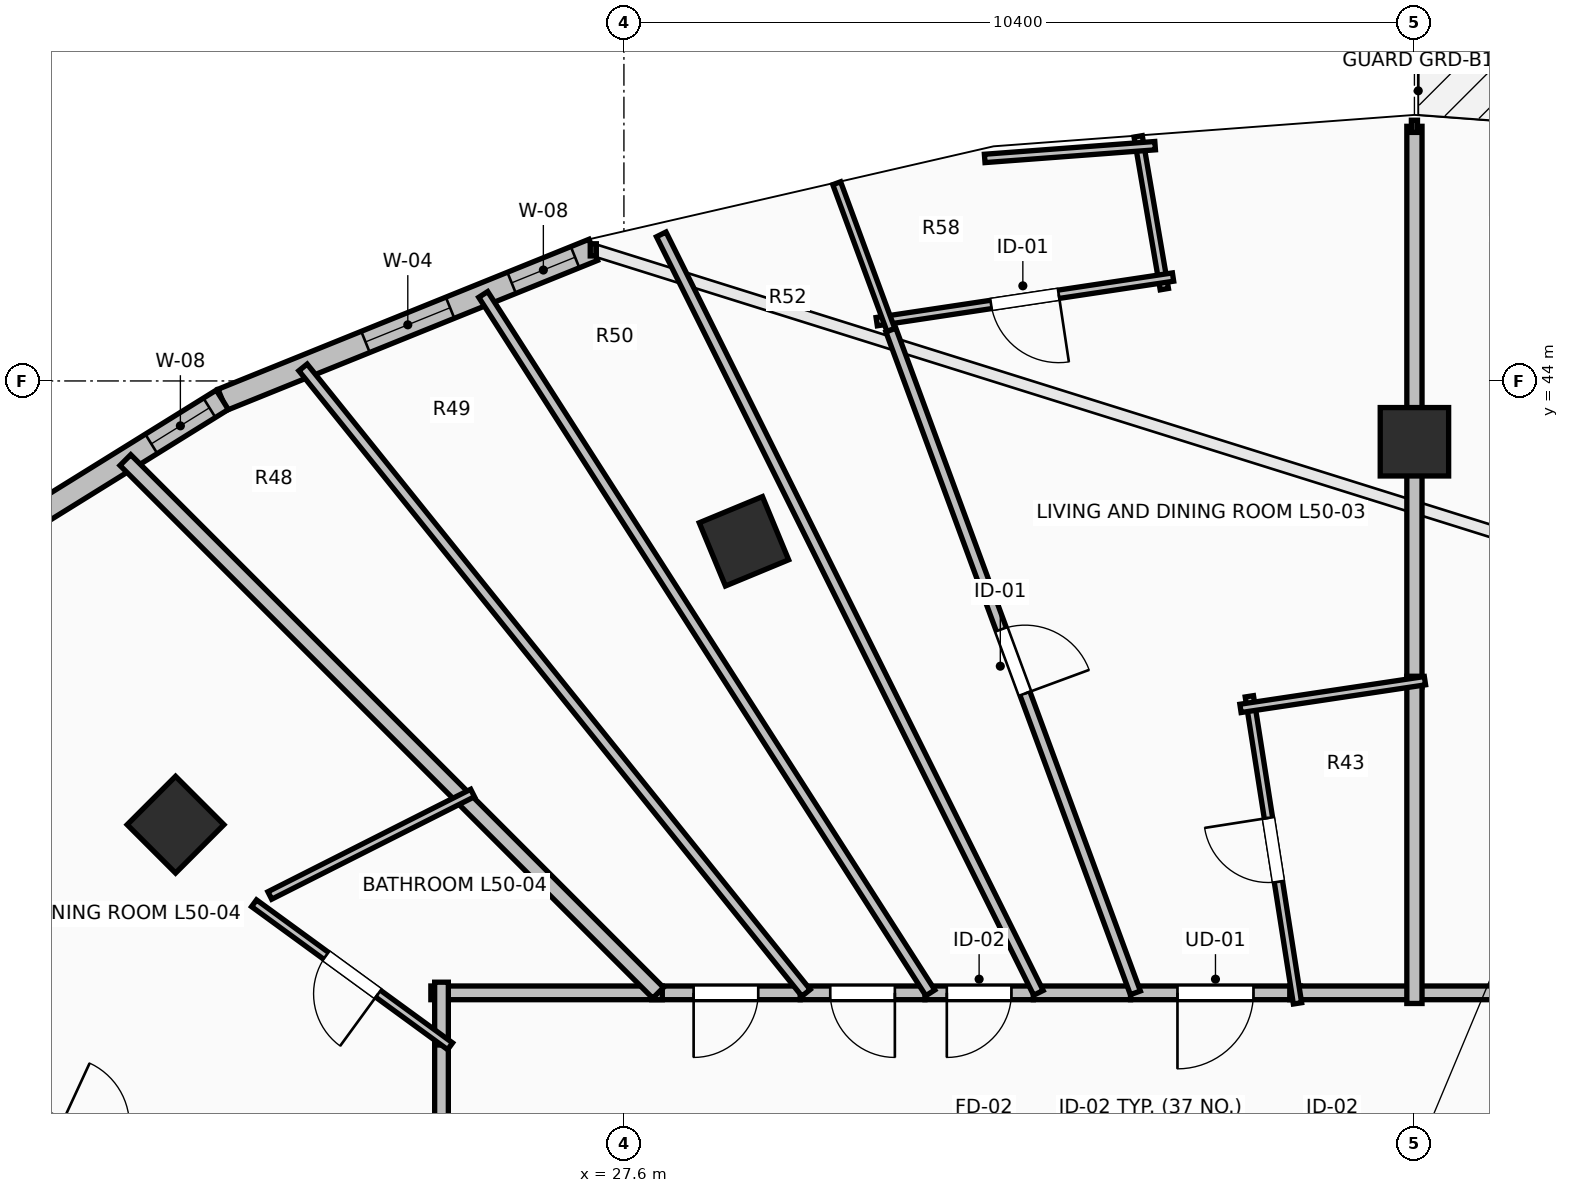
"""IFC4 building model, lengths in metres.
Left out: names, types, materials, properties, quantities, classifications, styles, units other than length and angle.
Written with IfcOpenShell. Run it as: python <this file> out.ifc"""

import sys

from ifc_helpers import new_model, si_unit, direction, frame, frame_2d, origin, origin_2d, place, context, subcontext, project, spatial, rectangle, extrude, element, fill, save


model = new_model("IFC4")
c1 = context("Model", 3, precision=1e-05, world=origin(), true_north=direction((0.0, 1.0)))
c2 = subcontext(c1, "Body", "Model", "MODEL_VIEW")
j1 = project(units=[si_unit("LENGTHUNIT", "METRE"), si_unit("PLANEANGLEUNIT", "RADIAN")], contexts=[c1])
p1 = place(None, origin())
s1 = spatial("IfcSite", under=j1, at=p1, CompositionType="ELEMENT")
p2 = place(p1, origin())
s2 = spatial("IfcBuilding", under=s1, at=p2, CompositionType="ELEMENT")
p3 = place(p2, frame((0.0, 0.0, 186.1)))
s3 = spatial("IfcBuildingStorey", under=s2, at=p3, CompositionType="ELEMENT", Elevation=186.1)
for number, where, z_axis, x_axis in (
    (1, (38.0, 43.2, 0.0), (0.0, 0.0, 1.0), (0.0, 1.0, 0.0)),
    (2, (29.179, 41.891, 0.0), (0.0, 0.0, 1.0), (-0.383, 0.924, 0.0)),
    (3, (21.701, 38.162, 0.0), (0.0, 0.0, 1.0), (-0.707, 0.707, 0.0)),
):
    element("IfcColumn", number, at=place(p3, frame(where, z_axis=z_axis, x_axis=x_axis)), inside=s3, PredefinedType="COLUMN", context=c2, shape_type="SweptSolid", body=[
        extrude(rectangle(XDim=0.9, YDim=0.9, at=origin_2d()), origin(), (0.0, 0.0, 1.0), 3.5),
    ])
p4 = place(p3, frame((27.197, 45.725, 0.0), z_axis=(0.0, 0.0, 1.0), x_axis=(-0.927111094334, -0.374786630981, 0.0)))
e4 = element("IfcWall", 4, at=p4, inside=s3, PredefinedType="STANDARD", context=c2, shape_type="SweptSolid", body=[
    extrude(rectangle(XDim=5.264, YDim=0.3, at=frame_2d((2.632, 0.0))), origin(), (0.0, 0.0, 1.0), 3.24),
])
p5 = place(p4, frame((0.258, 0.0, 0.85)))
e5 = element("IfcOpeningElement", 5, at=p5, cuts=e4, PredefinedType="OPENING", context=c2, shape_type="SweptSolid", body=[
    extrude(rectangle(XDim=0.9, YDim=1.8, at=frame_2d((0.45, 0.9))), frame((0.0, 0.165, 0.0), z_axis=(0.0, -1.0, 0.0), x_axis=(1.0, 0.0, 0.0)), (0.0, 0.0, 1.0), 0.33),
])
p6 = place(p4, frame((2.032, 0.0, 0.85)))
e6 = element("IfcOpeningElement", 6, at=p6, cuts=e4, PredefinedType="OPENING", context=c2, shape_type="SweptSolid", body=[
    extrude(rectangle(XDim=1.2, YDim=1.95, at=frame_2d((0.6, 0.975))), frame((0.0, 0.165, 0.0), z_axis=(0.0, -1.0, 0.0), x_axis=(1.0, 0.0, 0.0)), (0.0, 0.0, 1.0), 0.33),
])
p7 = place(p3, frame((22.316, 43.752, 0.0), z_axis=(0.0, 0.0, 1.0), x_axis=(-0.849647657754, -0.527350791858, 0.0)))
e7 = element("IfcWall", 7, at=p7, inside=s3, PredefinedType="STANDARD", context=c2, shape_type="SweptSolid", body=[
    extrude(rectangle(XDim=5.035, YDim=0.3, at=frame_2d((2.518, 0.0))), origin(), (0.0, 0.0, 1.0), 3.24),
])
p8 = place(p7, frame((0.199, 0.0, 0.85)))
e8 = element("IfcOpeningElement", 8, at=p8, cuts=e7, PredefinedType="OPENING", context=c2, shape_type="SweptSolid", body=[
    extrude(rectangle(XDim=0.9, YDim=1.8, at=frame_2d((0.45, 0.9))), frame((0.0, 0.165, 0.0), z_axis=(0.0, -1.0, 0.0), x_axis=(1.0, 0.0, 0.0)), (0.0, 0.0, 1.0), 0.33),
])
p9 = place(p3, frame((39.197, 35.95, 0.0), z_axis=(0.0, 0.0, 1.0), x_axis=(-1.0, 0.0, 0.0)))
e9 = element("IfcWall", 9, at=p9, inside=s3, PredefinedType="PARTITIONING", context=c2, shape_type="SweptSolid", body=[
    extrude(rectangle(XDim=1.257, YDim=0.18, at=frame_2d((0.628, 0.0))), origin(), (0.0, 0.0, 1.0), 2.922),
])
p10 = place(p3, frame((36.5, 35.95, 0.0), z_axis=(0.0, 0.0, 1.0), x_axis=(-1.0, 0.0, 0.0)))
e10 = element("IfcWall", 10, at=p10, inside=s3, PredefinedType="PARTITIONING", context=c2, shape_type="SweptSolid", body=[
    extrude(rectangle(XDim=2.235, YDim=0.18, at=frame_2d((1.118, 0.0))), origin(), (0.0, 0.0, 1.0), 2.922),
])
p11 = place(p10, frame((0.617, 0.0, 0.0)))
e11 = element("IfcOpeningElement", 11, at=p11, cuts=e10, PredefinedType="OPENING", context=c2, shape_type="SweptSolid", body=[
    extrude(rectangle(XDim=1.0, YDim=2.15, at=frame_2d((0.5, 1.075))), frame((0.0, 0.105, 0.0), z_axis=(0.0, -1.0, 0.0), x_axis=(1.0, 0.0, 0.0)), (0.0, 0.0, 1.0), 0.21),
])
p12 = place(p3, frame((38.08, 35.95, 0.0), z_axis=(0.0, 0.0, 1.0), x_axis=(-1.0, 0.0, 0.0)))
e12 = element("IfcWall", 12, at=p12, inside=s3, PredefinedType="PARTITIONING", context=c2, shape_type="SweptSolid", body=[
    extrude(rectangle(XDim=1.72, YDim=0.18, at=frame_2d((0.86, 0.0))), origin(), (0.0, 0.0, 1.0), 2.922),
])
p13 = place(p3, frame((34.265, 35.95, 0.0), z_axis=(0.0, 0.0, 1.0), x_axis=(-1.0, 0.0, 0.0)))
e13 = element("IfcWall", 13, at=p13, inside=s3, PredefinedType="PARTITIONING", context=c2, shape_type="SweptSolid", body=[
    extrude(rectangle(XDim=1.279, YDim=0.18, at=frame_2d((0.639, 0.0))), origin(), (0.0, 0.0, 1.0), 2.922),
])
p14 = place(p3, frame((32.986, 35.95, 0.0), z_axis=(0.0, 0.0, 1.0), x_axis=(-1.0, 0.0, 0.0)))
e14 = element("IfcWall", 14, at=p14, inside=s3, PredefinedType="PARTITIONING", context=c2, shape_type="SweptSolid", body=[
    extrude(rectangle(XDim=1.426, YDim=0.18, at=frame_2d((0.713, 0.0))), origin(), (0.0, 0.0, 1.0), 3.24),
])
p15 = place(p14, frame((0.288, 0.0, 0.0)))
e15 = element("IfcOpeningElement", 15, at=p15, cuts=e14, PredefinedType="OPENING", context=c2, shape_type="SweptSolid", body=[
    extrude(rectangle(XDim=0.85, YDim=2.1, at=frame_2d((0.425, 1.05))), frame((0.0, 0.105, 0.0), z_axis=(0.0, -1.0, 0.0), x_axis=(1.0, 0.0, 0.0)), (0.0, 0.0, 1.0), 0.21),
])
p16 = place(p3, frame((31.56, 35.95, 0.0), z_axis=(0.0, 0.0, 1.0), x_axis=(-1.0, 0.0, 0.0)))
e16 = element("IfcWall", 16, at=p16, inside=s3, PredefinedType="PARTITIONING", context=c2, shape_type="SweptSolid", body=[
    extrude(rectangle(XDim=1.641, YDim=0.18, at=frame_2d((0.821, 0.0))), origin(), (0.0, 0.0, 1.0), 2.432),
])
p17 = place(p16, frame((0.396, 0.0, 0.0)))
e17 = element("IfcOpeningElement", 17, at=p17, cuts=e16, PredefinedType="OPENING", context=c2, shape_type="SweptSolid", body=[
    extrude(rectangle(XDim=0.85, YDim=2.1, at=frame_2d((0.425, 1.05))), frame((0.0, 0.105, 0.0), z_axis=(0.0, -1.0, 0.0), x_axis=(1.0, 0.0, 0.0)), (0.0, 0.0, 1.0), 0.21),
])
p18 = place(p3, frame((29.919, 35.95, 0.0), z_axis=(0.0, 0.0, 1.0), x_axis=(-1.0, 0.0, 0.0)))
e18 = element("IfcWall", 18, at=p18, inside=s3, PredefinedType="PARTITIONING", context=c2, shape_type="SweptSolid", body=[
    extrude(rectangle(XDim=1.954, YDim=0.18, at=frame_2d((0.977, 0.0))), origin(), (0.0, 0.0, 1.0), 2.432),
])
p19 = place(p18, frame((0.552, 0.0, 0.0)))
e19 = element("IfcOpeningElement", 19, at=p19, cuts=e18, PredefinedType="OPENING", context=c2, shape_type="SweptSolid", body=[
    extrude(rectangle(XDim=0.85, YDim=2.1, at=frame_2d((0.425, 1.05))), frame((0.0, 0.105, 0.0), z_axis=(0.0, -1.0, 0.0), x_axis=(1.0, 0.0, 0.0)), (0.0, 0.0, 1.0), 0.21),
])
p20 = place(p3, frame((25.2, 35.404, 0.0), z_axis=(0.0, 0.0, 1.0), x_axis=(0.0, -1.0, 0.0)))
e20 = element("IfcWall", 20, at=p20, inside=s3, PredefinedType="PARTITIONING", context=c2, shape_type="SweptSolid", body=[
    extrude(rectangle(XDim=3.563, YDim=0.18, at=frame_2d((1.781, 0.0))), origin(), (0.0, 0.0, 1.0), 2.432),
])
p21 = place(p20, frame((1.281, 0.0, 0.0)))
e21 = element("IfcOpeningElement", 21, at=p21, cuts=e20, PredefinedType="OPENING", context=c2, shape_type="SweptSolid", body=[
    extrude(rectangle(XDim=1.0, YDim=2.15, at=frame_2d((0.5, 1.075))), frame((0.0, 0.105, 0.0), z_axis=(0.0, -1.0, 0.0), x_axis=(1.0, 0.0, 0.0)), (0.0, 0.0, 1.0), 0.21),
])
p22 = place(p3, frame((28.105, 35.95, 0.0), z_axis=(0.0, 0.0, 1.0), x_axis=(-1.0, 0.0, 0.0)))
e22 = element("IfcWall", 22, at=p22, inside=s3, PredefinedType="PARTITIONING", context=c2, shape_type="SweptSolid", body=[
    extrude(rectangle(XDim=3.045, YDim=0.18, at=frame_2d((1.522, 0.0))), origin(), (0.0, 0.0, 1.0), 2.432),
])
p23 = place(p3, frame((25.2, 36.09, 0.0), z_axis=(0.0, 0.0, 1.0), x_axis=(0.0, -1.0, 0.0)))
e23 = element("IfcWall", 23, at=p23, inside=s3, PredefinedType="PARTITIONING", context=c2, shape_type="SweptSolid", body=[
    extrude(rectangle(XDim=0.826, YDim=0.18, at=frame_2d((0.413, 0.0))), origin(), (0.0, 0.0, 1.0), 2.432),
])
p24 = place(p3, frame((38.0, 47.35, 0.0), z_axis=(0.0, 0.0, 1.0), x_axis=(0.0, -1.0, 0.0)))
e24 = element("IfcWall", 24, at=p24, inside=s3, PredefinedType="PARTITIONING", context=c2, shape_type="SweptSolid", body=[
    extrude(rectangle(XDim=7.375, YDim=0.2, at=frame_2d((3.688, 0.0))), origin(), (0.0, 0.0, 1.0), 3.24),
])
p25 = place(p3, frame((38.0, 40.115, 0.0), z_axis=(0.0, 0.0, 1.0), x_axis=(0.0, -1.0, 0.0)))
e25 = element("IfcWall", 25, at=p25, inside=s3, PredefinedType="PARTITIONING", context=c2, shape_type="SweptSolid", body=[
    extrude(rectangle(XDim=4.305, YDim=0.2, at=frame_2d((2.152, 0.0))), origin(), (0.0, 0.0, 1.0), 2.874),
])
p26 = place(p3, frame((36.462, 35.812, 0.0), z_axis=(0.0, 0.0, 1.0), x_axis=(-0.154883213323, 0.987932786292, 0.0)))
e26 = element("IfcWall", 26, at=p26, inside=s3, PredefinedType="PARTITIONING", context=c2, shape_type="SweptSolid", body=[
    extrude(rectangle(XDim=4.089, YDim=0.11, at=frame_2d((2.044, 0.0))), origin(), (0.0, 0.0, 1.0), 2.874),
])
p27 = place(p26, frame((1.619, 0.0, 0.0)))
e27 = element("IfcOpeningElement", 27, at=p27, cuts=e26, PredefinedType="OPENING", context=c2, shape_type="SweptSolid", body=[
    extrude(rectangle(XDim=0.85, YDim=2.1, at=frame_2d((0.425, 1.05))), frame((0.0, 0.07, 0.0), z_axis=(0.0, -1.0, 0.0), x_axis=(1.0, 0.0, 0.0)), (0.0, 0.0, 1.0), 0.14),
])
p28 = place(p3, frame((35.712, 39.692, 0.0), z_axis=(0.0, 0.0, 1.0), x_axis=(0.988892526147, 0.148632337431, 0.0)))
e28 = element("IfcWall", 28, at=p28, inside=s3, PredefinedType="PARTITIONING", context=c2, shape_type="SweptSolid", body=[
    extrude(rectangle(XDim=2.454, YDim=0.11, at=frame_2d((1.227, 0.0))), origin(), (0.0, 0.0, 1.0), 3.24),
])
p29 = place(p3, frame((34.365, 47.218, 0.0), z_axis=(0.0, 0.0, 1.0), x_axis=(0.168804313657, -0.985649584635, 0.0)))
e29 = element("IfcWall", 29, at=p29, inside=s3, PredefinedType="PARTITIONING", context=c2, shape_type="SweptSolid", body=[
    extrude(rectangle(XDim=2.039, YDim=0.11, at=frame_2d((1.02, 0.0))), origin(), (0.0, 0.0, 1.0), 3.24),
])
p30 = place(p3, frame((34.824, 45.367, 0.0), z_axis=(0.0, 0.0, 1.0), x_axis=(-0.988877230123, -0.148734070555, 0.0)))
e30 = element("IfcWall", 30, at=p30, inside=s3, PredefinedType="PARTITIONING", context=c2, shape_type="SweptSolid", body=[
    extrude(rectangle(XDim=3.943, YDim=0.11, at=frame_2d((1.971, 0.0))), origin(), (0.0, 0.0, 1.0), 3.24),
])
p31 = place(p30, frame((1.521, 0.0, 0.0)))
e31 = element("IfcOpeningElement", 31, at=p31, cuts=e30, PredefinedType="OPENING", context=c2, shape_type="SweptSolid", body=[
    extrude(rectangle(XDim=0.9, YDim=2.1, at=frame_2d((0.45, 1.05))), frame((0.0, 0.07, 0.0), z_axis=(0.0, -1.0, 0.0), x_axis=(1.0, 0.0, 0.0)), (0.0, 0.0, 1.0), 0.14),
])
p32 = place(p3, frame((31.113, 44.67, 0.0), z_axis=(0.0, 0.0, 1.0), x_axis=(-0.346337161188, 0.938110105894, 0.0)))
e32 = element("IfcWall", 32, at=p32, inside=s3, PredefinedType="PARTITIONING", context=c2, shape_type="SweptSolid", body=[
    extrude(rectangle(XDim=2.059, YDim=0.11, at=frame_2d((1.03, 0.0))), origin(), (0.0, 0.0, 1.0), 3.24),
])
p33 = place(p3, frame((34.589, 47.095, 0.0), z_axis=(0.0, 0.0, 1.0), x_axis=(-0.997205784552, -0.074703569226, 0.0)))
e33 = element("IfcWall", 33, at=p33, inside=s3, PredefinedType="PARTITIONING", context=c2, shape_type="SweptSolid", body=[
    extrude(rectangle(XDim=2.249, YDim=0.11, at=frame_2d((1.124, 0.0))), origin(), (0.0, 0.0, 1.0), 3.24),
])
p34 = place(p3, frame((31.112, 44.67, 0.0), z_axis=(0.0, 0.0, 1.0), x_axis=(0.346109472243, -0.938194134081, 0.0)))
e34 = element("IfcWall", 34, at=p34, inside=s3, PredefinedType="PARTITIONING", context=c2, shape_type="SweptSolid", body=[
    extrude(rectangle(XDim=9.294, YDim=0.14, at=frame_2d((4.647, 0.0))), origin(), (0.0, 0.0, 1.0), 2.432),
])
p35 = place(p34, frame((4.197, 0.0, 0.0)))
e35 = element("IfcOpeningElement", 35, at=p35, cuts=e34, PredefinedType="OPENING", context=c2, shape_type="SweptSolid", body=[
    extrude(rectangle(XDim=0.9, YDim=2.1, at=frame_2d((0.45, 1.05))), frame((0.0, 0.085, 0.0), z_axis=(0.0, -1.0, 0.0), x_axis=(1.0, 0.0, 0.0)), (0.0, 0.0, 1.0), 0.17),
])
p36 = place(p3, frame((28.091, 45.928, 0.0), z_axis=(0.0, 0.0, 1.0), x_axis=(0.445267068418, -0.895397809793, 0.0)))
e36 = element("IfcWall", 36, at=p36, inside=s3, PredefinedType="PARTITIONING", context=c2, shape_type="SweptSolid", body=[
    extrude(rectangle(XDim=11.144, YDim=0.14, at=frame_2d((5.572, 0.0))), origin(), (0.0, 0.0, 1.0), 2.432),
])
p37 = place(p3, frame((25.749, 45.138, 0.0), z_axis=(0.0, 0.0, 1.0), x_axis=(0.539168632786, -0.842197830335, 0.0)))
e37 = element("IfcWall", 37, at=p37, inside=s3, PredefinedType="PARTITIONING", context=c2, shape_type="SweptSolid", body=[
    extrude(rectangle(XDim=10.909, YDim=0.14, at=frame_2d((5.455, 0.0))), origin(), (0.0, 0.0, 1.0), 2.432),
])
p38 = place(p3, frame((23.378, 44.178, 0.0), z_axis=(0.0, 0.0, 1.0), x_axis=(0.626756813732, -0.779214923137, 0.0)))
e38 = element("IfcWall", 38, at=p38, inside=s3, PredefinedType="PARTITIONING", context=c2, shape_type="SweptSolid", body=[
    extrude(rectangle(XDim=10.559, YDim=0.14, at=frame_2d((5.28, 0.0))), origin(), (0.0, 0.0, 1.0), 2.432),
])
p39 = place(p3, frame((21.041, 42.959, 0.0), z_axis=(0.0, 0.0, 1.0), x_axis=(0.707106781187, -0.707106781187, 0.0)))
e39 = element("IfcWall", 39, at=p39, inside=s3, PredefinedType="PARTITIONING", context=c2, shape_type="SweptSolid", body=[
    extrude(rectangle(XDim=9.912, YDim=0.2, at=frame_2d((4.956, 0.0))), origin(), (0.0, 0.0, 1.0), 2.432),
])
p40 = place(p3, frame((25.313, 35.248, 0.0), z_axis=(0.0, 0.0, 1.0), x_axis=(-0.807968083988, 0.58922625133, 0.0)))
e40 = element("IfcWall", 40, at=p40, inside=s3, PredefinedType="PARTITIONING", context=c2, shape_type="SweptSolid", body=[
    extrude(rectangle(XDim=3.192, YDim=0.11, at=frame_2d((1.596, 0.0))), origin(), (0.0, 0.0, 1.0), 2.432),
])
p41 = place(p40, frame((1.171, 0.0, 0.0)))
e41 = element("IfcOpeningElement", 41, at=p41, cuts=e40, PredefinedType="OPENING", context=c2, shape_type="SweptSolid", body=[
    extrude(rectangle(XDim=0.85, YDim=2.1, at=frame_2d((0.425, 1.05))), frame((0.0, 0.07, 0.0), z_axis=(0.0, -1.0, 0.0), x_axis=(1.0, 0.0, 0.0)), (0.0, 0.0, 1.0), 0.14),
])
p42 = place(p3, frame((22.941, 37.231, 0.0), z_axis=(0.0, 0.0, 1.0), x_axis=(0.892507731149, 0.451032094024, 0.0)))
e42 = element("IfcWall", 42, at=p42, inside=s3, PredefinedType="PARTITIONING", context=c2, shape_type="SweptSolid", body=[
    extrude(rectangle(XDim=2.989, YDim=0.11, at=frame_2d((1.495, 0.0))), origin(), (0.0, 0.0, 1.0), 2.432),
])
p43 = place(p3, frame((16.006, 36.139, 0.0), z_axis=(0.0, 0.0, 1.0), x_axis=(0.908157621609, -0.41862839645, 0.0)))
e43 = element("IfcWall", 43, at=p43, inside=s3, PredefinedType="PARTITIONING", context=c2, shape_type="SweptSolid", body=[
    extrude(rectangle(XDim=10.124, YDim=0.14, at=frame_2d((5.062, 0.0))), origin(), (0.0, 0.0, 1.0), 2.774),
])
p44 = place(p43, frame((4.612, 0.0, 0.0)))
e44 = element("IfcOpeningElement", 44, at=p44, cuts=e43, PredefinedType="OPENING", context=c2, shape_type="SweptSolid", body=[
    extrude(rectangle(XDim=0.9, YDim=2.1, at=frame_2d((0.45, 1.05))), frame((0.0, 0.085, 0.0), z_axis=(0.0, -1.0, 0.0), x_axis=(1.0, 0.0, 0.0)), (0.0, 0.0, 1.0), 0.17),
])
p45 = place(p3, frame((12.609, 35.141, 0.0), z_axis=(0.0, 0.0, 1.0), x_axis=(0.940877411069, -0.338747246985, 0.0)))
e45 = element("IfcWall", 45, at=p45, inside=s3, PredefinedType="PARTITIONING", context=c2, shape_type="SweptSolid", body=[
    extrude(rectangle(XDim=13.382, YDim=0.14, at=frame_2d((6.691, 0.0))), origin(), (0.0, 0.0, 1.0), 2.774),
])
p46 = place(p45, frame((6.266, 0.0, 0.0)))
e46 = element("IfcOpeningElement", 46, at=p46, cuts=e45, PredefinedType="OPENING", context=c2, shape_type="SweptSolid", body=[
    extrude(rectangle(XDim=0.85, YDim=2.1, at=frame_2d((0.425, 1.05))), frame((0.0, 0.085, 0.0), z_axis=(0.0, -1.0, 0.0), x_axis=(1.0, 0.0, 0.0)), (0.0, 0.0, 1.0), 0.17),
])
p47 = place(p5, origin())
e47 = element("IfcWindow", 47, at=p47, inside=s3, PartitioningType="SINGLE_PANEL", PredefinedType="WINDOW", context=c2, shape_type="SweptSolid", body=[
    extrude(rectangle(XDim=0.9, YDim=1.8, at=frame_2d((0.45, 0.9))), frame((0.0, 0.03, 0.0), z_axis=(0.0, -1.0, 0.0), x_axis=(1.0, 0.0, 0.0)), (0.0, 0.0, 1.0), 0.06),
])
fill(e5, e47)
p48 = place(p6, origin())
e48 = element("IfcWindow", 48, at=p48, inside=s3, PartitioningType="SINGLE_PANEL", PredefinedType="WINDOW", context=c2, shape_type="SweptSolid", body=[
    extrude(rectangle(XDim=1.2, YDim=1.95, at=frame_2d((0.6, 0.975))), frame((0.0, 0.03, 0.0), z_axis=(0.0, -1.0, 0.0), x_axis=(1.0, 0.0, 0.0)), (0.0, 0.0, 1.0), 0.06),
])
fill(e6, e48)
p49 = place(p8, origin())
e49 = element("IfcWindow", 49, at=p49, inside=s3, PartitioningType="SINGLE_PANEL", PredefinedType="WINDOW", context=c2, shape_type="SweptSolid", body=[
    extrude(rectangle(XDim=0.9, YDim=1.8, at=frame_2d((0.45, 0.9))), frame((0.0, 0.03, 0.0), z_axis=(0.0, -1.0, 0.0), x_axis=(1.0, 0.0, 0.0)), (0.0, 0.0, 1.0), 0.06),
])
fill(e8, e49)
p50 = place(p11, origin())
e50 = element("IfcDoor", 50, at=p50, inside=s3, OperationType="SINGLE_SWING_RIGHT", PredefinedType="DOOR", context=c2, shape_type="SweptSolid", body=[
    extrude(rectangle(XDim=1.0, YDim=2.15, at=frame_2d((0.5, 1.075))), frame((0.0, 0.025, 0.0), z_axis=(0.0, -1.0, 0.0), x_axis=(1.0, 0.0, 0.0)), (0.0, 0.0, 1.0), 0.05),
])
fill(e11, e50)
p51 = place(p27, origin())
e51 = element("IfcDoor", 51, at=p51, inside=s3, OperationType="SINGLE_SWING_RIGHT", PredefinedType="DOOR", context=c2, shape_type="SweptSolid", body=[
    extrude(rectangle(XDim=0.85, YDim=2.1, at=frame_2d((0.425, 1.05))), frame((0.0, 0.025, 0.0), z_axis=(0.0, -1.0, 0.0), x_axis=(1.0, 0.0, 0.0)), (0.0, 0.0, 1.0), 0.05),
])
fill(e27, e51)
p52 = place(p31, origin())
e52 = element("IfcDoor", 52, at=p52, inside=s3, OperationType="SINGLE_SWING_LEFT", PredefinedType="DOOR", context=c2, shape_type="SweptSolid", body=[
    extrude(rectangle(XDim=0.9, YDim=2.1, at=frame_2d((0.45, 1.05))), frame((0.0, 0.025, 0.0), z_axis=(0.0, -1.0, 0.0), x_axis=(1.0, 0.0, 0.0)), (0.0, 0.0, 1.0), 0.05),
])
fill(e31, e52)
p53 = place(p35, origin())
e53 = element("IfcDoor", 53, at=p53, inside=s3, OperationType="SINGLE_SWING_RIGHT", PredefinedType="DOOR", context=c2, shape_type="SweptSolid", body=[
    extrude(rectangle(XDim=0.9, YDim=2.1, at=frame_2d((0.45, 1.05))), frame((0.0, 0.025, 0.0), z_axis=(0.0, -1.0, 0.0), x_axis=(1.0, 0.0, 0.0)), (0.0, 0.0, 1.0), 0.05),
])
fill(e35, e53)
p54 = place(p41, origin())
e54 = element("IfcDoor", 54, at=p54, inside=s3, OperationType="SINGLE_SWING_LEFT", PredefinedType="DOOR", context=c2, shape_type="SweptSolid", body=[
    extrude(rectangle(XDim=0.85, YDim=2.1, at=frame_2d((0.425, 1.05))), frame((0.0, 0.025, 0.0), z_axis=(0.0, -1.0, 0.0), x_axis=(1.0, 0.0, 0.0)), (0.0, 0.0, 1.0), 0.05),
])
fill(e41, e54)
p55 = place(p15, origin())
e55 = element("IfcDoor", 55, at=p55, inside=s3, OperationType="SINGLE_SWING_RIGHT", PredefinedType="DOOR", context=c2, shape_type="SweptSolid", body=[
    extrude(rectangle(XDim=0.85, YDim=2.1, at=frame_2d((0.425, 1.05))), frame((0.0, 0.025, 0.0), z_axis=(0.0, -1.0, 0.0), x_axis=(1.0, 0.0, 0.0)), (0.0, 0.0, 1.0), 0.05),
])
fill(e15, e55)
p56 = place(p17, origin())
e56 = element("IfcDoor", 56, at=p56, inside=s3, OperationType="SINGLE_SWING_LEFT", PredefinedType="DOOR", context=c2, shape_type="SweptSolid", body=[
    extrude(rectangle(XDim=0.85, YDim=2.1, at=frame_2d((0.425, 1.05))), frame((0.0, 0.025, 0.0), z_axis=(0.0, -1.0, 0.0), x_axis=(1.0, 0.0, 0.0)), (0.0, 0.0, 1.0), 0.05),
])
fill(e17, e56)
p57 = place(p19, origin())
e57 = element("IfcDoor", 57, at=p57, inside=s3, OperationType="SINGLE_SWING_RIGHT", PredefinedType="DOOR", context=c2, shape_type="SweptSolid", body=[
    extrude(rectangle(XDim=0.85, YDim=2.1, at=frame_2d((0.425, 1.05))), frame((0.0, 0.025, 0.0), z_axis=(0.0, -1.0, 0.0), x_axis=(1.0, 0.0, 0.0)), (0.0, 0.0, 1.0), 0.05),
])
fill(e19, e57)
save(model, sys.argv[1])
